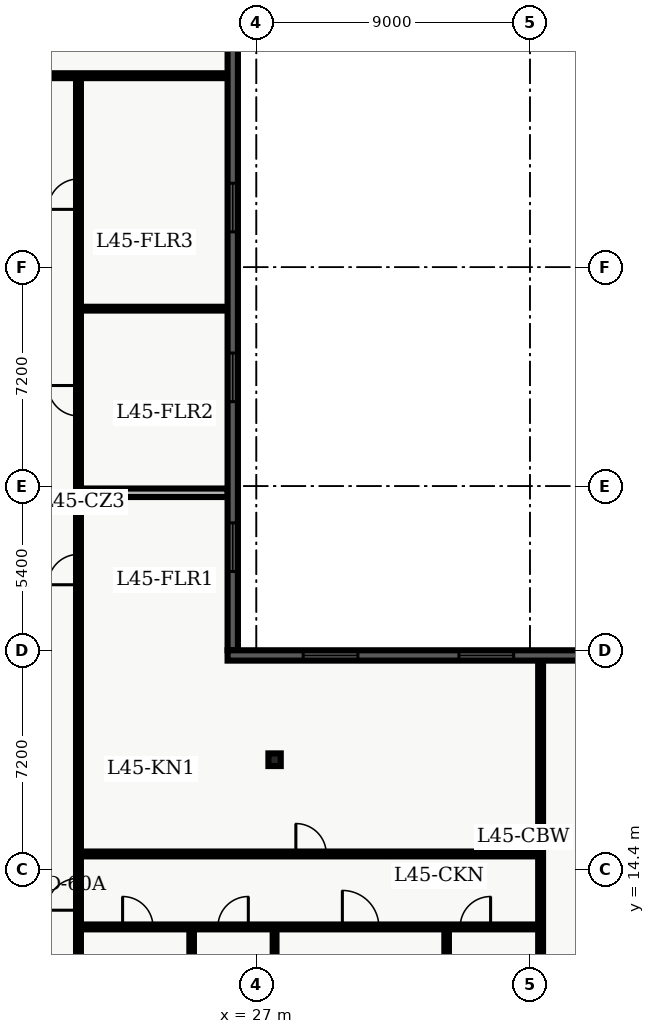
"""IFC4 building model, lengths in metres.
Left out: names, types, materials, properties, quantities, classifications, styles, units other than length and angle.
Written with IfcOpenShell. Run it as: python <this file> out.ifc"""

import sys

from ifc_helpers import new_model, entity, si_unit, converted_unit, direction, frame, origin_with_axes, origin_2d_with_axis, place, context, subcontext, project, spatial, polyline, rectangle, i_section, outline, extrude, element, fill, save


model = new_model("IFC4")
c1 = context("Model", 3, precision=1e-05, world=origin_with_axes(), true_north=direction((0.0, 1.0)))
c2 = subcontext(c1, "Body", "Model", "MODEL_VIEW")
j1 = project(units=[si_unit("LENGTHUNIT", "METRE"), converted_unit("PLANEANGLEUNIT", "DEGREE", entity("IfcPlaneAngleMeasure", 0.017), si_unit("PLANEANGLEUNIT", "RADIAN"), dimensions=[0, 0, 0, 0, 0, 0, 0])], contexts=[c1])
p1 = place(None, origin_with_axes())
s1 = spatial("IfcSite", under=j1, at=p1, CompositionType="ELEMENT")
p2 = place(p1, origin_with_axes())
s2 = spatial("IfcBuilding", under=s1, at=p2, CompositionType="ELEMENT")
p3 = place(p2, frame((0.0, 0.0, 183.6), z_axis=(0.0, 0.0, 1.0), x_axis=(1.0, 0.0, 0.0)))
s3 = spatial("IfcBuildingStorey", under=s2, at=p3, CompositionType="ELEMENT", Elevation=183.6)
p4 = place(p3, frame((27.6, 18.0, 0.0), z_axis=(0.0, 0.0, 1.0), x_axis=(1.0, 0.0, 0.0)))
e1 = element("IfcColumn", 1, at=p4, inside=s3, PredefinedType="COLUMN", context=c2, shape_type="SweptSolid", body=[
    extrude(i_section(OverallWidth=0.406, OverallDepth=0.416, WebThickness=0.03, FlangeThickness=0.048, FilletRadius=0.022, at=origin_2d_with_axis()), origin_with_axes(), (0.0, 0.0, 1.0), 3.9),
])
p5 = place(p3, frame((2.6, 40.5, 0.0), z_axis=(0.0, 0.0, 1.0), x_axis=(1.0, 0.0, 0.0)))
e2 = element("IfcWall", 2, at=p5, inside=s3, PredefinedType="PARTITIONING", context=c2, shape_type="SweptSolid", body=[
    extrude(outline(polyline([(0.0, -0.08), (23.459, -0.08), (23.459, 0.08), (0.0, 0.08), (0.0, -0.08)])), origin_with_axes(), (0.0, 0.0, 1.0), 2.64),
])
p6 = place(p5, frame((2.422, 0.0, 0.0), z_axis=(0.0, 0.0, 1.0), x_axis=(1.0, 0.0, 0.0)))
e3 = element("IfcOpeningElement", 3, at=p6, cuts=e2, PredefinedType="OPENING", context=c2, shape_type="SweptSolid", body=[
    extrude(rectangle(XDim=1.0, YDim=0.18, at=origin_2d_with_axis()), origin_with_axes(), (0.0, 0.0, 1.0), 2.15),
])
p7 = place(p5, frame((7.756, 0.0, 0.0), z_axis=(0.0, 0.0, 1.0), x_axis=(1.0, 0.0, 0.0)))
e4 = element("IfcOpeningElement", 4, at=p7, cuts=e2, PredefinedType="OPENING", context=c2, shape_type="SweptSolid", body=[
    extrude(rectangle(XDim=1.0, YDim=0.18, at=origin_2d_with_axis()), origin_with_axes(), (0.0, 0.0, 1.0), 2.15),
])
p8 = place(p5, frame((14.089, 0.0, 0.0), z_axis=(0.0, 0.0, 1.0), x_axis=(1.0, 0.0, 0.0)))
e5 = element("IfcOpeningElement", 5, at=p8, cuts=e2, PredefinedType="OPENING", context=c2, shape_type="SweptSolid", body=[
    extrude(rectangle(XDim=1.2, YDim=0.18, at=origin_2d_with_axis()), origin_with_axes(), (0.0, 0.0, 1.0), 2.2),
])
p9 = place(p3, frame((21.15, 7.8, 0.0), z_axis=(0.0, 0.0, 1.0), x_axis=(0.0, 1.0, 0.0)))
e6 = element("IfcWall", 6, at=p9, inside=s3, PredefinedType="PARTITIONING", context=c2, shape_type="SweptSolid", body=[
    extrude(outline(polyline([(0.0, -0.08), (32.7, -0.08), (32.7, 0.08), (0.0, 0.08), (0.0, -0.08)])), origin_with_axes(), (0.0, 0.0, 1.0), 2.64),
])
p10 = place(p9, frame((16.456, 0.0, 0.0), z_axis=(0.0, 0.0, 1.0), x_axis=(1.0, 0.0, 0.0)))
e7 = element("IfcOpeningElement", 7, at=p10, cuts=e6, PredefinedType="OPENING", context=c2, shape_type="SweptSolid", body=[
    extrude(rectangle(XDim=1.0, YDim=0.18, at=origin_2d_with_axis()), origin_with_axes(), (0.0, 0.0, 1.0), 2.15),
])
p11 = place(p9, frame((22.009, 0.0, 0.0), z_axis=(0.0, 0.0, 1.0), x_axis=(1.0, 0.0, 0.0)))
e8 = element("IfcOpeningElement", 8, at=p11, cuts=e6, PredefinedType="OPENING", context=c2, shape_type="SweptSolid", body=[
    extrude(rectangle(XDim=1.0, YDim=0.18, at=origin_2d_with_axis()), origin_with_axes(), (0.0, 0.0, 1.0), 2.15),
])
p12 = place(p9, frame((28.803, 0.0, 0.0), z_axis=(0.0, 0.0, 1.0), x_axis=(1.0, 0.0, 0.0)))
e9 = element("IfcOpeningElement", 9, at=p12, cuts=e6, PredefinedType="OPENING", context=c2, shape_type="SweptSolid", body=[
    extrude(rectangle(XDim=1.0, YDim=0.18, at=origin_2d_with_axis()), origin_with_axes(), (0.0, 0.0, 1.0), 2.15),
])
p13 = place(p9, frame((5.775, 0.0, 0.0), z_axis=(0.0, 0.0, 1.0), x_axis=(1.0, 0.0, 0.0)))
e10 = element("IfcOpeningElement", 10, at=p13, cuts=e6, PredefinedType="OPENING", context=c2, shape_type="SweptSolid", body=[
    extrude(rectangle(XDim=1.05, YDim=0.18, at=origin_2d_with_axis()), origin_with_axes(), (0.0, 0.0, 1.0), 2.15),
])
p14 = place(p3, frame((21.3, 26.781, 0.0), z_axis=(0.0, 0.0, 1.0), x_axis=(1.0, 0.0, 0.0)))
e11 = element("IfcWall", 11, at=p14, inside=s3, PredefinedType="PARTITIONING", context=c2, shape_type="SweptSolid", body=[
    extrude(outline(polyline([(0.0, -0.14), (4.759, -0.14), (4.759, 0.14), (0.0, 0.14), (0.0, -0.14)])), origin_with_axes(), (0.0, 0.0, 1.0), 2.64),
])
p15 = place(p3, frame((21.3, 32.837, 0.0), z_axis=(0.0, 0.0, 1.0), x_axis=(1.0, 0.0, 0.0)))
e12 = element("IfcWall", 12, at=p15, inside=s3, PredefinedType="PARTITIONING", context=c2, shape_type="SweptSolid", body=[
    extrude(outline(polyline([(0.0, -0.062), (4.759, -0.062), (4.759, 0.062), (0.0, 0.062), (0.0, -0.062)])), origin_with_axes(), (0.0, 0.0, 1.0), 2.64),
])
p16 = place(p3, frame((21.15, 12.5, 0.0), z_axis=(0.0, 0.0, 1.0), x_axis=(1.0, 0.0, 0.0)))
e13 = element("IfcWall", 13, at=p16, inside=s3, PredefinedType="PARTITIONING", context=c2, shape_type="SweptSolid", body=[
    extrude(outline(polyline([(0.0, -0.08), (15.2, -0.08), (15.2, 0.08), (0.0, 0.08), (0.0, -0.08)])), origin_with_axes(), (0.0, 0.0, 1.0), 2.64),
])
p17 = place(p16, frame((1.951, 0.0, 0.0), z_axis=(0.0, 0.0, 1.0), x_axis=(1.0, 0.0, 0.0)))
e14 = element("IfcOpeningElement", 14, at=p17, cuts=e13, PredefinedType="OPENING", context=c2, shape_type="SweptSolid", body=[
    extrude(rectangle(XDim=1.0, YDim=0.18, at=origin_2d_with_axis()), origin_with_axes(), (0.0, 0.0, 1.0), 2.15),
])
p18 = place(p16, frame((5.086, 0.0, 0.0), z_axis=(0.0, 0.0, 1.0), x_axis=(1.0, 0.0, 0.0)))
e15 = element("IfcOpeningElement", 15, at=p18, cuts=e13, PredefinedType="OPENING", context=c2, shape_type="SweptSolid", body=[
    extrude(rectangle(XDim=1.0, YDim=0.18, at=origin_2d_with_axis()), origin_with_axes(), (0.0, 0.0, 1.0), 2.15),
])
p19 = place(p16, frame((9.28, 0.0, 0.0), z_axis=(0.0, 0.0, 1.0), x_axis=(1.0, 0.0, 0.0)))
e16 = element("IfcOpeningElement", 16, at=p19, cuts=e13, PredefinedType="OPENING", context=c2, shape_type="SweptSolid", body=[
    extrude(rectangle(XDim=1.2, YDim=0.18, at=origin_2d_with_axis()), origin_with_axes(), (0.0, 0.0, 1.0), 2.2),
])
p20 = place(p16, frame((13.055, 0.0, 0.0), z_axis=(0.0, 0.0, 1.0), x_axis=(1.0, 0.0, 0.0)))
e17 = element("IfcOpeningElement", 17, at=p20, cuts=e13, PredefinedType="OPENING", context=c2, shape_type="SweptSolid", body=[
    extrude(rectangle(XDim=1.0, YDim=0.18, at=origin_2d_with_axis()), origin_with_axes(), (0.0, 0.0, 1.0), 2.15),
])
p21 = place(p3, frame((21.15, 14.9, 0.0), z_axis=(0.0, 0.0, 1.0), x_axis=(1.0, 0.0, 0.0)))
e18 = element("IfcWall", 18, at=p21, inside=s3, PredefinedType="PARTITIONING", context=c2, shape_type="SweptSolid", body=[
    extrude(outline(polyline([(0.0, -0.08), (15.2, -0.08), (15.2, 0.08), (0.0, 0.08), (0.0, -0.08)])), origin_with_axes(), (0.0, 0.0, 1.0), 2.64),
])
p22 = place(p21, frame((7.65, 0.0, 0.0), z_axis=(0.0, 0.0, 1.0), x_axis=(1.0, 0.0, 0.0)))
e19 = element("IfcOpeningElement", 19, at=p22, cuts=e18, PredefinedType="OPENING", context=c2, shape_type="SweptSolid", body=[
    extrude(rectangle(XDim=1.0, YDim=0.18, at=origin_2d_with_axis()), origin_with_axes(), (0.0, 0.0, 1.0), 2.15),
])
p23 = place(p3, frame((36.35, 4.35, 0.0), z_axis=(0.0, 0.0, 1.0), x_axis=(0.0, 1.0, 0.0)))
e20 = element("IfcWall", 20, at=p23, inside=s3, PredefinedType="PARTITIONING", context=c2, shape_type="SweptSolid", body=[
    extrude(outline(polyline([(0.0, -0.08), (16.95, -0.08), (16.95, 0.08), (0.0, 0.08), (0.0, -0.08)])), origin_with_axes(), (0.0, 0.0, 1.0), 2.64),
])
p24 = place(p3, frame((24.872, 0.335, 0.0), z_axis=(0.0, 0.0, 1.0), x_axis=(0.0, 1.0, 0.0)))
e21 = element("IfcWall", 21, at=p24, inside=s3, PredefinedType="PARTITIONING", context=c2, shape_type="SweptSolid", body=[
    extrude(outline(polyline([(0.0, -0.075), (12.045, -0.075), (12.045, 0.075), (0.0, 0.075), (0.0, -0.075)])), origin_with_axes(), (0.0, 0.0, 1.0), 2.64),
])
p25 = place(p3, frame((27.6, 0.335, 0.0), z_axis=(0.0, 0.0, 1.0), x_axis=(0.0, 1.0, 0.0)))
e22 = element("IfcWall", 22, at=p25, inside=s3, PredefinedType="PARTITIONING", context=c2, shape_type="SweptSolid", body=[
    extrude(outline(polyline([(0.0, -0.062), (12.045, -0.062), (12.045, 0.062), (0.0, 0.062), (0.0, -0.062)])), origin_with_axes(), (0.0, 0.0, 1.0), 2.64),
])
p26 = place(p3, frame((33.259, 0.335, 0.0), z_axis=(0.0, 0.0, 1.0), x_axis=(0.0, 1.0, 0.0)))
e23 = element("IfcWall", 23, at=p26, inside=s3, PredefinedType="PARTITIONING", context=c2, shape_type="SweptSolid", body=[
    extrude(outline(polyline([(0.0, -0.075), (12.045, -0.075), (12.045, 0.075), (0.0, 0.075), (0.0, -0.075)])), origin_with_axes(), (0.0, 0.0, 1.0), 2.64),
])
p27 = place(p3, frame((26.224, 45.14, 0.0), z_axis=(0.0, 0.0, 1.0), x_axis=(0.0, -1.0, 0.0)))
e24 = element("IfcWall", 24, at=p27, inside=s3, PredefinedType="SOLIDWALL", context=c2, shape_type="SweptSolid", body=[
    extrude(outline(polyline([(0.0, -0.17), (23.54, -0.17), (23.54, 0.17), (0.0, 0.17), (0.0, -0.17)])), origin_with_axes(), (0.0, 0.0, 1.0), 3.6),
])
p28 = place(p27, frame((2.943, 0.0, 0.45), z_axis=(0.0, 0.0, 1.0), x_axis=(1.0, 0.0, 0.0)))
e25 = element("IfcOpeningElement", 25, at=p28, cuts=e24, PredefinedType="OPENING", context=c2, shape_type="SweptSolid", body=[
    extrude(rectangle(XDim=1.6, YDim=0.36, at=origin_2d_with_axis()), origin_with_axes(), (0.0, 0.0, 1.0), 2.2),
])
p29 = place(p27, frame((8.977, 0.0, 0.45), z_axis=(0.0, 0.0, 1.0), x_axis=(1.0, 0.0, 0.0)))
e26 = element("IfcOpeningElement", 26, at=p29, cuts=e24, PredefinedType="OPENING", context=c2, shape_type="SweptSolid", body=[
    extrude(rectangle(XDim=1.6, YDim=0.36, at=origin_2d_with_axis()), origin_with_axes(), (0.0, 0.0, 1.0), 2.2),
])
p30 = place(p27, frame((14.562, 0.0, 0.45), z_axis=(0.0, 0.0, 1.0), x_axis=(1.0, 0.0, 0.0)))
e27 = element("IfcOpeningElement", 27, at=p30, cuts=e24, PredefinedType="OPENING", context=c2, shape_type="SweptSolid", body=[
    extrude(rectangle(XDim=1.6, YDim=0.36, at=origin_2d_with_axis()), origin_with_axes(), (0.0, 0.0, 1.0), 2.2),
])
p31 = place(p27, frame((20.148, 0.0, 0.45), z_axis=(0.0, 0.0, 1.0), x_axis=(1.0, 0.0, 0.0)))
e28 = element("IfcOpeningElement", 28, at=p31, cuts=e24, PredefinedType="OPENING", context=c2, shape_type="SweptSolid", body=[
    extrude(rectangle(XDim=1.6, YDim=0.36, at=origin_2d_with_axis()), origin_with_axes(), (0.0, 0.0, 1.0), 2.2),
])
p32 = place(p3, frame((26.054, 21.43, 0.0), z_axis=(0.0, 0.0, 1.0), x_axis=(1.0, 0.0, 0.0)))
e29 = element("IfcWall", 29, at=p32, inside=s3, PredefinedType="SOLIDWALL", context=c2, shape_type="SweptSolid", body=[
    extrude(outline(polyline([(0.0, -0.17), (12.346, -0.17), (12.346, 0.17), (0.0, 0.17), (0.0, -0.17)])), origin_with_axes(), (0.0, 0.0, 1.0), 3.6),
])
p33 = place(p32, frame((3.387, 0.0, 0.45), z_axis=(0.0, 0.0, 1.0), x_axis=(1.0, 0.0, 0.0)))
e30 = element("IfcOpeningElement", 30, at=p33, cuts=e29, PredefinedType="OPENING", context=c2, shape_type="SweptSolid", body=[
    extrude(rectangle(XDim=1.8, YDim=0.36, at=origin_2d_with_axis()), origin_with_axes(), (0.0, 0.0, 1.0), 2.1),
])
p34 = place(p32, frame((8.509, 0.0, 0.45), z_axis=(0.0, 0.0, 1.0), x_axis=(1.0, 0.0, 0.0)))
e31 = element("IfcOpeningElement", 31, at=p34, cuts=e29, PredefinedType="OPENING", context=c2, shape_type="SweptSolid", body=[
    extrude(rectangle(XDim=1.8, YDim=0.36, at=origin_2d_with_axis()), origin_with_axes(), (0.0, 0.0, 1.0), 2.1),
])
p35 = place(p9, frame((16.456, 0.0, 0.0), z_axis=(0.0, 0.0, 1.0), x_axis=(1.0, 0.0, 0.0)))
e32 = element("IfcDoor", 32, at=p35, inside=s3, OperationType="SINGLE_SWING_LEFT", PredefinedType="DOOR", context=c2, shape_type="SweptSolid", body=[
    extrude(rectangle(XDim=1.0, YDim=0.09, at=origin_2d_with_axis()), origin_with_axes(), (0.0, 0.0, 1.0), 2.15),
])
fill(e7, e32)
p36 = place(p9, frame((22.009, 0.0, 0.0), z_axis=(0.0, 0.0, 1.0), x_axis=(1.0, 0.0, 0.0)))
e33 = element("IfcDoor", 33, at=p36, inside=s3, OperationType="SINGLE_SWING_RIGHT", PredefinedType="DOOR", context=c2, shape_type="SweptSolid", body=[
    extrude(rectangle(XDim=1.0, YDim=0.09, at=origin_2d_with_axis()), origin_with_axes(), (0.0, 0.0, 1.0), 2.15),
])
fill(e8, e33)
p37 = place(p9, frame((28.803, 0.0, 0.0), z_axis=(0.0, 0.0, 1.0), x_axis=(1.0, 0.0, 0.0)))
e34 = element("IfcDoor", 34, at=p37, inside=s3, OperationType="SINGLE_SWING_LEFT", PredefinedType="DOOR", context=c2, shape_type="SweptSolid", body=[
    extrude(rectangle(XDim=1.0, YDim=0.09, at=origin_2d_with_axis()), origin_with_axes(), (0.0, 0.0, 1.0), 2.15),
])
fill(e9, e34)
p38 = place(p9, frame((5.775, 0.0, 0.0), z_axis=(0.0, 0.0, 1.0), x_axis=(1.0, 0.0, 0.0)))
e35 = element("IfcDoor", 35, at=p38, inside=s3, OperationType="SINGLE_SWING_LEFT", PredefinedType="DOOR", context=c2, shape_type="SweptSolid", body=[
    extrude(rectangle(XDim=1.05, YDim=0.09, at=origin_2d_with_axis()), origin_with_axes(), (0.0, 0.0, 1.0), 2.15),
])
fill(e10, e35)
p39 = place(p16, frame((1.951, 0.0, 0.0), z_axis=(0.0, 0.0, 1.0), x_axis=(1.0, 0.0, 0.0)))
e36 = element("IfcDoor", 36, at=p39, inside=s3, OperationType="SINGLE_SWING_LEFT", PredefinedType="DOOR", context=c2, shape_type="SweptSolid", body=[
    extrude(rectangle(XDim=1.0, YDim=0.09, at=origin_2d_with_axis()), origin_with_axes(), (0.0, 0.0, 1.0), 2.15),
])
fill(e14, e36)
p40 = place(p16, frame((5.086, 0.0, 0.0), z_axis=(0.0, 0.0, 1.0), x_axis=(1.0, 0.0, 0.0)))
e37 = element("IfcDoor", 37, at=p40, inside=s3, OperationType="SINGLE_SWING_RIGHT", PredefinedType="DOOR", context=c2, shape_type="SweptSolid", body=[
    extrude(rectangle(XDim=1.0, YDim=0.09, at=origin_2d_with_axis()), origin_with_axes(), (0.0, 0.0, 1.0), 2.15),
])
fill(e15, e37)
p41 = place(p16, frame((9.28, 0.0, 0.0), z_axis=(0.0, 0.0, 1.0), x_axis=(1.0, 0.0, 0.0)))
e38 = element("IfcDoor", 38, at=p41, inside=s3, OperationType="SINGLE_SWING_LEFT", PredefinedType="DOOR", context=c2, shape_type="SweptSolid", body=[
    extrude(rectangle(XDim=1.2, YDim=0.09, at=origin_2d_with_axis()), origin_with_axes(), (0.0, 0.0, 1.0), 2.2),
])
fill(e16, e38)
p42 = place(p16, frame((13.055, 0.0, 0.0), z_axis=(0.0, 0.0, 1.0), x_axis=(1.0, 0.0, 0.0)))
e39 = element("IfcDoor", 39, at=p42, inside=s3, OperationType="SINGLE_SWING_RIGHT", PredefinedType="DOOR", context=c2, shape_type="SweptSolid", body=[
    extrude(rectangle(XDim=1.0, YDim=0.09, at=origin_2d_with_axis()), origin_with_axes(), (0.0, 0.0, 1.0), 2.15),
])
fill(e17, e39)
p43 = place(p21, frame((7.65, 0.0, 0.0), z_axis=(0.0, 0.0, 1.0), x_axis=(1.0, 0.0, 0.0)))
e40 = element("IfcDoor", 40, at=p43, inside=s3, OperationType="SINGLE_SWING_LEFT", PredefinedType="DOOR", context=c2, shape_type="SweptSolid", body=[
    extrude(rectangle(XDim=1.0, YDim=0.09, at=origin_2d_with_axis()), origin_with_axes(), (0.0, 0.0, 1.0), 2.15),
])
fill(e19, e40)
p44 = place(p27, frame((8.977, 0.0, 0.45), z_axis=(0.0, 0.0, 1.0), x_axis=(1.0, 0.0, 0.0)))
e41 = element("IfcWindow", 41, at=p44, inside=s3, PredefinedType="WINDOW", context=c2, shape_type="SweptSolid", body=[
    extrude(rectangle(XDim=1.6, YDim=0.09, at=origin_2d_with_axis()), origin_with_axes(), (0.0, 0.0, 1.0), 2.2),
])
fill(e26, e41)
p45 = place(p27, frame((14.562, 0.0, 0.45), z_axis=(0.0, 0.0, 1.0), x_axis=(1.0, 0.0, 0.0)))
e42 = element("IfcWindow", 42, at=p45, inside=s3, PredefinedType="WINDOW", context=c2, shape_type="SweptSolid", body=[
    extrude(rectangle(XDim=1.6, YDim=0.09, at=origin_2d_with_axis()), origin_with_axes(), (0.0, 0.0, 1.0), 2.2),
])
fill(e27, e42)
p46 = place(p27, frame((20.148, 0.0, 0.45), z_axis=(0.0, 0.0, 1.0), x_axis=(1.0, 0.0, 0.0)))
e43 = element("IfcWindow", 43, at=p46, inside=s3, PredefinedType="WINDOW", context=c2, shape_type="SweptSolid", body=[
    extrude(rectangle(XDim=1.6, YDim=0.09, at=origin_2d_with_axis()), origin_with_axes(), (0.0, 0.0, 1.0), 2.2),
])
fill(e28, e43)
p47 = place(p32, frame((3.387, 0.0, 0.45), z_axis=(0.0, 0.0, 1.0), x_axis=(1.0, 0.0, 0.0)))
e44 = element("IfcWindow", 44, at=p47, inside=s3, PredefinedType="WINDOW", context=c2, shape_type="SweptSolid", body=[
    extrude(rectangle(XDim=1.8, YDim=0.09, at=origin_2d_with_axis()), origin_with_axes(), (0.0, 0.0, 1.0), 2.1),
])
fill(e30, e44)
p48 = place(p32, frame((8.509, 0.0, 0.45), z_axis=(0.0, 0.0, 1.0), x_axis=(1.0, 0.0, 0.0)))
e45 = element("IfcWindow", 45, at=p48, inside=s3, PredefinedType="WINDOW", context=c2, shape_type="SweptSolid", body=[
    extrude(rectangle(XDim=1.8, YDim=0.09, at=origin_2d_with_axis()), origin_with_axes(), (0.0, 0.0, 1.0), 2.1),
])
fill(e31, e45)
save(model, sys.argv[1])
